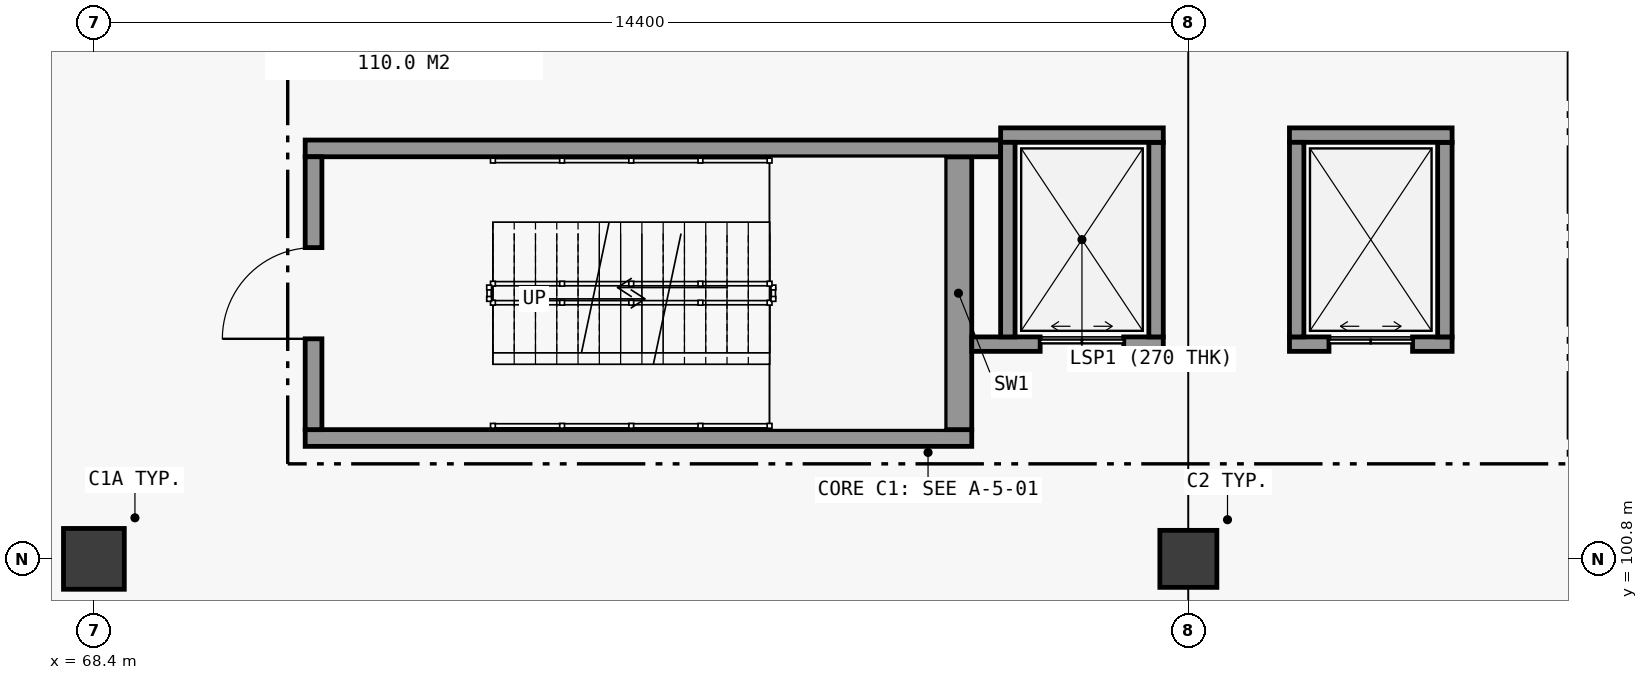
"""IFC4 building model, lengths in metres.
Left out: names, types, materials, properties, quantities, classifications, styles, units other than length and angle.
Written with IfcOpenShell. Run it as: python <this file> out.ifc"""

import sys

from ifc_helpers import new_model, si_unit, direction, frame, frame_2d, origin, origin_2d, place, context, subcontext, project, spatial, rectangle, extrude, element, fill, save


model = new_model("IFC4")
c1 = context("Model", 3, precision=1e-05, world=origin(), true_north=direction((0.0, 1.0)))
c2 = subcontext(c1, "Body", "Model", "MODEL_VIEW")
j1 = project(units=[si_unit("LENGTHUNIT", "METRE"), si_unit("PLANEANGLEUNIT", "RADIAN")], contexts=[c1])
p1 = place(None, origin())
s1 = spatial("IfcSite", under=j1, at=p1, CompositionType="ELEMENT")
p2 = place(p1, origin())
s2 = spatial("IfcBuilding", under=s1, at=p2, CompositionType="ELEMENT")
p3 = place(p2, frame((0.0, 0.0, -4.8)))
s3 = spatial("IfcBuildingStorey", under=s2, at=p3, CompositionType="ELEMENT", Elevation=-4.8)
p4 = place(p3, frame((68.4, 100.8, 0.0), z_axis=(0.0, 0.0, 1.0), x_axis=(1.0, 0.0, 0.0)))
e1 = element("IfcColumn", 1, at=p4, inside=s3, PredefinedType="COLUMN", context=c2, shape_type="SweptSolid", body=[
    extrude(rectangle(XDim=0.8, YDim=0.8, at=origin_2d()), origin(), (0.0, 0.0, 1.0), 4.8),
])
p5 = place(p3, frame((82.8, 100.8, 0.0), z_axis=(0.0, 0.0, 1.0), x_axis=(1.0, 0.0, 0.0)))
e2 = element("IfcColumn", 2, at=p5, inside=s3, PredefinedType="COLUMN", context=c2, shape_type="SweptSolid", body=[
    extrude(rectangle(XDim=0.75, YDim=0.75, at=origin_2d()), origin(), (0.0, 0.0, 1.0), 4.8),
])
p6 = place(p3, frame((71.18, 102.39, 0.0), z_axis=(0.0, 0.0, 1.0), x_axis=(1.0, 0.0, 0.0)))
e3 = element("IfcWall", 3, at=p6, inside=s3, PredefinedType="SOLIDWALL", context=c2, shape_type="SweptSolid", body=[
    extrude(rectangle(XDim=8.77, YDim=0.22, at=frame_2d((4.385, 0.0))), origin(), (0.0, 0.0, 1.0), 4.5),
])
p7 = place(p3, frame((79.775, 102.5, 0.0), z_axis=(0.0, 0.0, 1.0), x_axis=(0.0, 1.0, 0.0)))
e4 = element("IfcWall", 4, at=p7, inside=s3, PredefinedType="SHEAR", context=c2, shape_type="SweptSolid", body=[
    extrude(rectangle(XDim=3.59, YDim=0.35, at=frame_2d((1.795, 0.0))), origin(), (0.0, 0.0, 1.0), 4.5),
])
p8 = place(p3, frame((80.33, 106.2, 0.0), z_axis=(0.0, 0.0, 1.0), x_axis=(-1.0, 0.0, 0.0)))
e5 = element("IfcWall", 5, at=p8, inside=s3, PredefinedType="SOLIDWALL", context=c2, shape_type="SweptSolid", body=[
    extrude(rectangle(XDim=9.15, YDim=0.22, at=frame_2d((4.575, 0.0))), origin(), (0.0, 0.0, 1.0), 4.5),
])
p9 = place(p3, frame((71.29, 106.09, 0.0), z_axis=(0.0, 0.0, 1.0), x_axis=(0.0, -1.0, 0.0)))
e6 = element("IfcWall", 6, at=p9, inside=s3, PredefinedType="SOLIDWALL", context=c2, shape_type="SweptSolid", body=[
    extrude(rectangle(XDim=3.59, YDim=0.22, at=frame_2d((1.795, 0.0))), origin(), (0.0, 0.0, 1.0), 4.5),
])
p10 = place(p9, frame((1.195, 0.0, 0.0)))
e7 = element("IfcOpeningElement", 7, at=p10, cuts=e6, PredefinedType="OPENING", context=c2, shape_type="SweptSolid", body=[
    extrude(rectangle(XDim=1.2, YDim=2.2, at=frame_2d((0.6, 1.1))), frame((0.0, 0.125, 0.0), z_axis=(0.0, -1.0, 0.0), x_axis=(1.0, 0.0, 0.0)), (0.0, 0.0, 1.0), 0.25),
])
p11 = place(p3, frame((79.95, 103.625, 0.0), z_axis=(0.0, 0.0, 1.0), x_axis=(1.0, 0.0, 0.0)))
e8 = element("IfcWall", 8, at=p11, inside=s3, PredefinedType="SOLIDWALL", context=c2, shape_type="SweptSolid", body=[
    extrude(rectangle(XDim=2.52, YDim=0.19, at=frame_2d((1.26, 0.0))), origin(), (0.0, 0.0, 1.0), 4.5),
])
p12 = place(p11, frame((0.9, 0.0, 0.0)))
e9 = element("IfcOpeningElement", 9, at=p12, cuts=e8, PredefinedType="OPENING", context=c2, shape_type="SweptSolid", body=[
    extrude(rectangle(XDim=1.1, YDim=2.2, at=frame_2d((0.55, 1.1))), frame((0.0, 0.11, 0.0), z_axis=(0.0, -1.0, 0.0), x_axis=(1.0, 0.0, 0.0)), (0.0, 0.0, 1.0), 0.22),
])
p13 = place(p3, frame((82.375, 103.72, 0.0), z_axis=(0.0, 0.0, 1.0), x_axis=(0.0, 1.0, 0.0)))
e10 = element("IfcWall", 10, at=p13, inside=s3, PredefinedType="SOLIDWALL", context=c2, shape_type="SweptSolid", body=[
    extrude(rectangle(XDim=2.56, YDim=0.19, at=frame_2d((1.28, 0.0))), origin(), (0.0, 0.0, 1.0), 4.5),
])
p14 = place(p3, frame((82.47, 106.375, 0.0), z_axis=(0.0, 0.0, 1.0), x_axis=(-1.0, 0.0, 0.0)))
e11 = element("IfcWall", 11, at=p14, inside=s3, PredefinedType="SOLIDWALL", context=c2, shape_type="SweptSolid", body=[
    extrude(rectangle(XDim=2.14, YDim=0.19, at=frame_2d((1.07, 0.0))), origin(), (0.0, 0.0, 1.0), 4.5),
])
p15 = place(p3, frame((80.425, 106.28, 0.0), z_axis=(0.0, 0.0, 1.0), x_axis=(0.0, -1.0, 0.0)))
e12 = element("IfcWall", 12, at=p15, inside=s3, PredefinedType="SOLIDWALL", context=c2, shape_type="SweptSolid", body=[
    extrude(rectangle(XDim=2.56, YDim=0.19, at=frame_2d((1.28, 0.0))), origin(), (0.0, 0.0, 1.0), 4.5),
])
p16 = place(p3, frame((84.13, 103.625, 0.0), z_axis=(0.0, 0.0, 1.0), x_axis=(1.0, 0.0, 0.0)))
e13 = element("IfcWall", 13, at=p16, inside=s3, PredefinedType="SOLIDWALL", context=c2, shape_type="SweptSolid", body=[
    extrude(rectangle(XDim=2.14, YDim=0.19, at=frame_2d((1.07, 0.0))), origin(), (0.0, 0.0, 1.0), 4.5),
])
p17 = place(p16, frame((0.52, 0.0, 0.0)))
e14 = element("IfcOpeningElement", 14, at=p17, cuts=e13, PredefinedType="OPENING", context=c2, shape_type="SweptSolid", body=[
    extrude(rectangle(XDim=1.1, YDim=2.2, at=frame_2d((0.55, 1.1))), frame((0.0, 0.11, 0.0), z_axis=(0.0, -1.0, 0.0), x_axis=(1.0, 0.0, 0.0)), (0.0, 0.0, 1.0), 0.22),
])
p18 = place(p3, frame((86.175, 103.72, 0.0), z_axis=(0.0, 0.0, 1.0), x_axis=(0.0, 1.0, 0.0)))
e15 = element("IfcWall", 15, at=p18, inside=s3, PredefinedType="SOLIDWALL", context=c2, shape_type="SweptSolid", body=[
    extrude(rectangle(XDim=2.56, YDim=0.19, at=frame_2d((1.28, 0.0))), origin(), (0.0, 0.0, 1.0), 4.5),
])
p19 = place(p3, frame((86.27, 106.375, 0.0), z_axis=(0.0, 0.0, 1.0), x_axis=(-1.0, 0.0, 0.0)))
e16 = element("IfcWall", 16, at=p19, inside=s3, PredefinedType="SOLIDWALL", context=c2, shape_type="SweptSolid", body=[
    extrude(rectangle(XDim=2.14, YDim=0.19, at=frame_2d((1.07, 0.0))), origin(), (0.0, 0.0, 1.0), 4.5),
])
p20 = place(p3, frame((84.225, 106.28, 0.0), z_axis=(0.0, 0.0, 1.0), x_axis=(0.0, -1.0, 0.0)))
e17 = element("IfcWall", 17, at=p20, inside=s3, PredefinedType="SOLIDWALL", context=c2, shape_type="SweptSolid", body=[
    extrude(rectangle(XDim=2.56, YDim=0.19, at=frame_2d((1.28, 0.0))), origin(), (0.0, 0.0, 1.0), 4.5),
])
p21 = place(p10, frame((1.2, 0.0, 0.0), z_axis=(0.0, 0.0, 1.0), x_axis=(-1.0, 0.0, 0.0)))
e18 = element("IfcDoor", 18, at=p21, inside=s3, OperationType="SINGLE_SWING_RIGHT", PredefinedType="DOOR", context=c2, shape_type="SweptSolid", body=[
    extrude(rectangle(XDim=1.2, YDim=2.2, at=frame_2d((0.6, 1.1))), frame((0.0, 0.025, 0.0), z_axis=(0.0, -1.0, 0.0), x_axis=(1.0, 0.0, 0.0)), (0.0, 0.0, 1.0), 0.05),
])
fill(e7, e18)
p22 = place(p12, origin())
e19 = element("IfcDoor", 19, at=p22, inside=s3, OperationType="DOUBLE_DOOR_SLIDING", PredefinedType="DOOR", context=c2, shape_type="SweptSolid", body=[
    extrude(rectangle(XDim=1.1, YDim=2.2, at=frame_2d((0.55, 1.1))), frame((0.0, 0.025, 0.0), z_axis=(0.0, -1.0, 0.0), x_axis=(1.0, 0.0, 0.0)), (0.0, 0.0, 1.0), 0.05),
])
fill(e9, e19)
p23 = place(p17, origin())
e20 = element("IfcDoor", 20, at=p23, inside=s3, OperationType="DOUBLE_DOOR_SLIDING", PredefinedType="DOOR", context=c2, shape_type="SweptSolid", body=[
    extrude(rectangle(XDim=1.1, YDim=2.2, at=frame_2d((0.55, 1.1))), frame((0.0, 0.025, 0.0), z_axis=(0.0, -1.0, 0.0), x_axis=(1.0, 0.0, 0.0)), (0.0, 0.0, 1.0), 0.05),
])
fill(e14, e20)
save(model, sys.argv[1])
